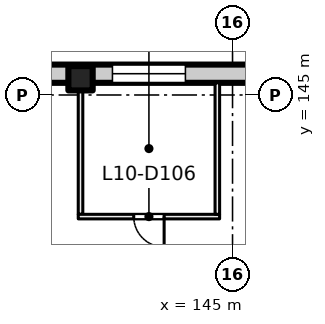
"""IFC4 building model, lengths in metres.
Left out: names, types, materials, properties, quantities, classifications, styles, units other than length and angle.
Written with IfcOpenShell. Run it as: python <this file> out.ifc"""

import sys

from ifc_helpers import new_model, si_unit, direction, frame, frame_2d, origin, origin_2d, place, context, subcontext, project, spatial, rectangle, extrude, element, fill, save


model = new_model("IFC4")
c1 = context("Model", 3, precision=1e-05, world=origin(), true_north=direction((0.0, 1.0)))
c2 = subcontext(c1, "Body", "Model", "MODEL_VIEW")
j1 = project(units=[si_unit("LENGTHUNIT", "METRE"), si_unit("PLANEANGLEUNIT", "RADIAN")], contexts=[c1])
p1 = place(None, origin())
s1 = spatial("IfcSite", under=j1, at=p1, CompositionType="ELEMENT")
p2 = place(p1, origin())
s2 = spatial("IfcBuilding", under=s1, at=p2, CompositionType="ELEMENT")
p3 = place(p2, frame((0.0, 0.0, 47.5)))
s3 = spatial("IfcBuildingStorey", under=s2, at=p3, CompositionType="ELEMENT", Elevation=47.5)
p4 = place(p3, frame((140.0, 145.55, 0.0), z_axis=(0.0, 0.0, 1.0), x_axis=(1.0, 0.0, 0.0)))
e1 = element("IfcColumn", 1, at=p4, inside=s3, PredefinedType="COLUMN", context=c2, shape_type="SweptSolid", body=[
    extrude(rectangle(XDim=0.8, YDim=0.8, at=origin_2d()), origin(), (0.0, 0.0, 1.0), 4.0),
])
p5 = place(p3, frame((131.07, 145.7, 0.0), z_axis=(0.0, 0.0, 1.0), x_axis=(1.0, 0.0, 0.0)))
e2 = element("IfcWall", 2, at=p5, inside=s3, PredefinedType="SOLIDWALL", context=c2, shape_type="SweptSolid", body=[
    extrude(rectangle(XDim=31.93, YDim=0.6, at=frame_2d((15.965, 0.0))), origin(), (0.0, 0.0, 1.0), 3.625),
])
p6 = place(p5, frame((0.98, 0.0, 0.9)))
e3 = element("IfcOpeningElement", 3, at=p6, cuts=e2, PredefinedType="OPENING", context=c2, shape_type="SweptSolid", body=[
    extrude(rectangle(XDim=2.4, YDim=2.4, at=frame_2d((1.2, 1.2))), frame((0.0, 0.31, 0.0), z_axis=(0.0, -1.0, 0.0), x_axis=(1.0, 0.0, 0.0)), (0.0, 0.0, 1.0), 0.62),
])
p7 = place(p5, frame((5.48, 0.0, 0.9)))
e4 = element("IfcOpeningElement", 4, at=p7, cuts=e2, PredefinedType="OPENING", context=c2, shape_type="SweptSolid", body=[
    extrude(rectangle(XDim=2.4, YDim=2.4, at=frame_2d((1.2, 1.2))), frame((0.0, 0.31, 0.0), z_axis=(0.0, -1.0, 0.0), x_axis=(1.0, 0.0, 0.0)), (0.0, 0.0, 1.0), 0.62),
])
p8 = place(p5, frame((9.98, 0.0, 0.9)))
e5 = element("IfcOpeningElement", 5, at=p8, cuts=e2, PredefinedType="OPENING", context=c2, shape_type="SweptSolid", body=[
    extrude(rectangle(XDim=2.4, YDim=2.4, at=frame_2d((1.2, 1.2))), frame((0.0, 0.31, 0.0), z_axis=(0.0, -1.0, 0.0), x_axis=(1.0, 0.0, 0.0)), (0.0, 0.0, 1.0), 0.62),
])
p9 = place(p5, frame((14.48, 0.0, 0.9)))
e6 = element("IfcOpeningElement", 6, at=p9, cuts=e2, PredefinedType="OPENING", context=c2, shape_type="SweptSolid", body=[
    extrude(rectangle(XDim=2.4, YDim=2.4, at=frame_2d((1.2, 1.2))), frame((0.0, 0.31, 0.0), z_axis=(0.0, -1.0, 0.0), x_axis=(1.0, 0.0, 0.0)), (0.0, 0.0, 1.0), 0.62),
])
p10 = place(p5, frame((18.98, 0.0, 0.9)))
e7 = element("IfcOpeningElement", 7, at=p10, cuts=e2, PredefinedType="OPENING", context=c2, shape_type="SweptSolid", body=[
    extrude(rectangle(XDim=2.4, YDim=2.4, at=frame_2d((1.2, 1.2))), frame((0.0, 0.31, 0.0), z_axis=(0.0, -1.0, 0.0), x_axis=(1.0, 0.0, 0.0)), (0.0, 0.0, 1.0), 0.62),
])
p11 = place(p5, frame((23.48, 0.0, 0.9)))
e8 = element("IfcOpeningElement", 8, at=p11, cuts=e2, PredefinedType="OPENING", context=c2, shape_type="SweptSolid", body=[
    extrude(rectangle(XDim=2.4, YDim=2.4, at=frame_2d((1.2, 1.2))), frame((0.0, 0.31, 0.0), z_axis=(0.0, -1.0, 0.0), x_axis=(1.0, 0.0, 0.0)), (0.0, 0.0, 1.0), 0.62),
])
p12 = place(p5, frame((27.98, 0.0, 0.9)))
e9 = element("IfcOpeningElement", 9, at=p12, cuts=e2, PredefinedType="OPENING", context=c2, shape_type="SweptSolid", body=[
    extrude(rectangle(XDim=2.4, YDim=2.4, at=frame_2d((1.2, 1.2))), frame((0.0, 0.31, 0.0), z_axis=(0.0, -1.0, 0.0), x_axis=(1.0, 0.0, 0.0)), (0.0, 0.0, 1.0), 0.62),
])
p13 = place(p3, frame((140.0, 141.075, 0.0), z_axis=(0.0, 0.0, 1.0), x_axis=(0.0, 1.0, 0.0)))
e10 = element("IfcWall", 10, at=p13, inside=s3, PredefinedType="PARTITIONING", context=c2, shape_type="SweptSolid", body=[
    extrude(rectangle(XDim=4.325, YDim=0.15, at=frame_2d((2.163, 0.0))), origin(), (0.0, 0.0, 1.0), 3.625),
])
p14 = place(p3, frame((144.575, 141.0, 0.0), z_axis=(0.0, 0.0, 1.0), x_axis=(-1.0, 0.0, 0.0)))
e11 = element("IfcWall", 11, at=p14, inside=s3, PredefinedType="PARTITIONING", context=c2, shape_type="SweptSolid", body=[
    extrude(rectangle(XDim=4.65, YDim=0.15, at=frame_2d((2.325, 0.0))), origin(), (0.0, 0.0, 1.0), 3.625),
])
p15 = place(p14, frame((1.825, 0.0, 0.0)))
e12 = element("IfcOpeningElement", 12, at=p15, cuts=e11, PredefinedType="OPENING", context=c2, shape_type="SweptSolid", body=[
    extrude(rectangle(XDim=1.0, YDim=2.1, at=frame_2d((0.5, 1.05))), frame((0.0, 0.085, 0.0), z_axis=(0.0, -1.0, 0.0), x_axis=(1.0, 0.0, 0.0)), (0.0, 0.0, 1.0), 0.17),
])
p16 = place(p3, frame((144.5, 145.4, 0.0), z_axis=(0.0, 0.0, 1.0), x_axis=(0.0, -1.0, 0.0)))
e13 = element("IfcWall", 13, at=p16, inside=s3, PredefinedType="PARTITIONING", context=c2, shape_type="SweptSolid", body=[
    extrude(rectangle(XDim=4.325, YDim=0.15, at=frame_2d((2.163, 0.0))), origin(), (0.0, 0.0, 1.0), 3.625),
])
p17 = place(p8, origin())
e14 = element("IfcWindow", 14, at=p17, inside=s3, PartitioningType="SINGLE_PANEL", PredefinedType="WINDOW", context=c2, shape_type="SweptSolid", body=[
    extrude(rectangle(XDim=2.4, YDim=2.4, at=frame_2d((1.2, 1.2))), frame((0.0, 0.03, 0.0), z_axis=(0.0, -1.0, 0.0), x_axis=(1.0, 0.0, 0.0)), (0.0, 0.0, 1.0), 0.06),
])
fill(e5, e14)
p18 = place(p15, origin())
e15 = element("IfcDoor", 15, at=p18, inside=s3, OperationType="SINGLE_SWING_LEFT", PredefinedType="DOOR", context=c2, shape_type="SweptSolid", body=[
    extrude(rectangle(XDim=1.0, YDim=2.1, at=frame_2d((0.5, 1.05))), frame((0.0, 0.025, 0.0), z_axis=(0.0, -1.0, 0.0), x_axis=(1.0, 0.0, 0.0)), (0.0, 0.0, 1.0), 0.05),
])
fill(e12, e15)
save(model, sys.argv[1])
